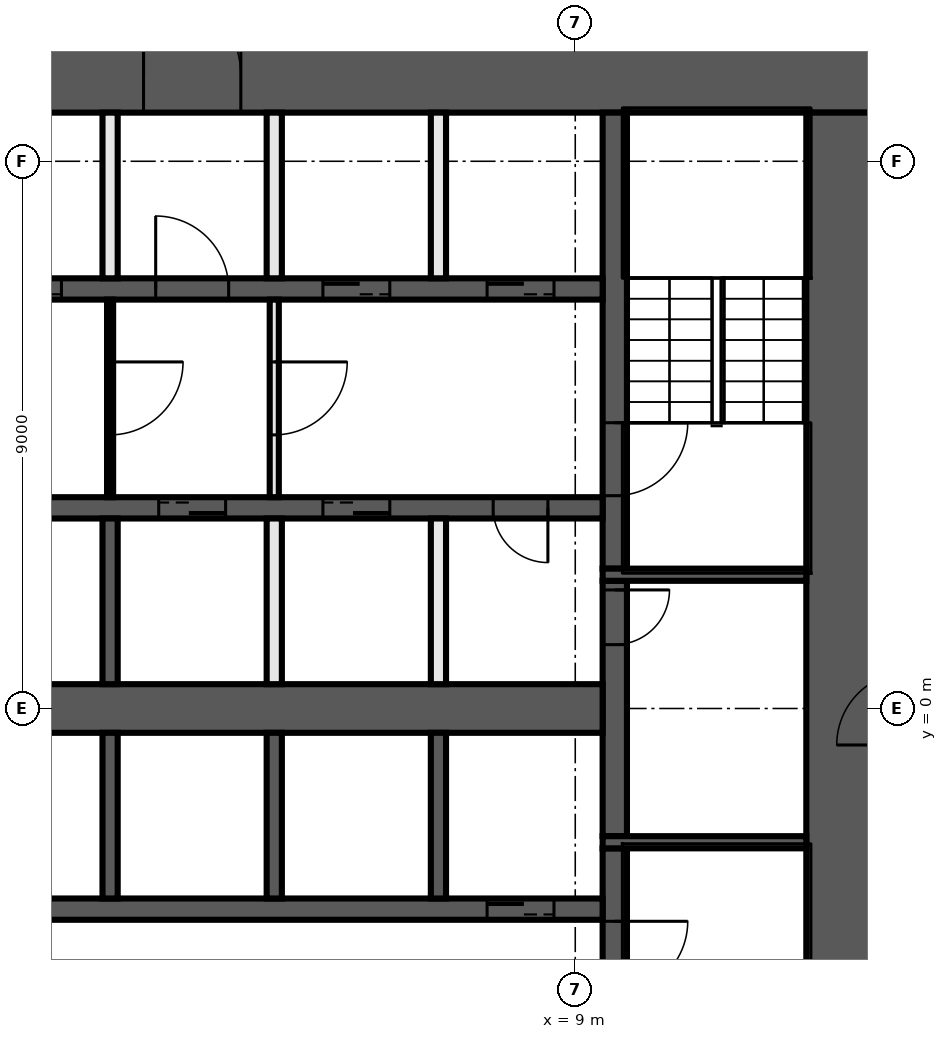
"""IFC4 building model, lengths in metres.
Left out: names, types, materials, properties, quantities, classifications, styles, units other than length and angle.
Written with IfcOpenShell. Run it as: python <this file> out.ifc"""

import sys

from ifc_helpers import new_model, si_unit, direction, frame, frame_2d, origin, place, context, subcontext, project, spatial, rectangle, extrude, element, fill, save


model = new_model("IFC4")
c1 = context("Model", 3, precision=1e-05, world=origin(), true_north=direction((0.0, 1.0)))
c2 = subcontext(c1, "Body", "Model", "MODEL_VIEW")
j1 = project(units=[si_unit("LENGTHUNIT", "METRE"), si_unit("PLANEANGLEUNIT", "RADIAN")], contexts=[c1])
p1 = place(None, origin())
s1 = spatial("IfcSite", under=j1, at=p1, CompositionType="ELEMENT")
p2 = place(p1, origin())
s2 = spatial("IfcBuilding", under=s1, at=p2, CompositionType="ELEMENT")
p3 = place(p2, frame((0.0, 0.0, -11.5)))
s3 = spatial("IfcBuildingStorey", under=s2, at=p3, CompositionType="ELEMENT", Elevation=-11.5)
p4 = place(p3, frame((-14.0, 10.4, 0.0), z_axis=(0.0, 0.0, 1.0), x_axis=(1.0, 0.0, 0.0)))
e1 = element("IfcWall", 1, at=p4, inside=s3, PredefinedType="SHEAR", context=c2, shape_type="SweptSolid", body=[
    extrude(rectangle(XDim=28.0, YDim=1.2, at=frame_2d((14.0, 0.0))), origin(), (0.0, 0.0, 1.0), 5.1),
])
p5 = place(p4, frame((15.9, 0.0, 0.0)))
e2 = element("IfcOpeningElement", 2, at=p5, cuts=e1, PredefinedType="OPENING", context=c2, shape_type="SweptSolid", body=[
    extrude(rectangle(XDim=1.6, YDim=2.1, at=frame_2d((0.8, 1.05))), frame((0.0, 0.61, 0.0), z_axis=(0.0, -1.0, 0.0), x_axis=(1.0, 0.0, 0.0)), (0.0, 0.0, 1.0), 1.22),
])
p6 = place(p3, frame((13.4, 9.8, 0.0), z_axis=(0.0, 0.0, 1.0), x_axis=(0.0, -1.0, 0.0)))
e3 = element("IfcWall", 3, at=p6, inside=s3, PredefinedType="SHEAR", context=c2, shape_type="SweptSolid", body=[
    extrude(rectangle(XDim=19.6, YDim=1.2, at=frame_2d((9.8, 0.0))), origin(), (0.0, 0.0, 1.0), 5.1),
])
p7 = place(p3, frame((9.65, -2.3, 0.0), z_axis=(0.0, 0.0, 1.0), x_axis=(0.0, -1.0, 0.0)))
e4 = element("IfcWall", 4, at=p7, inside=s3, PredefinedType="SHEAR", context=c2, shape_type="SweptSolid", body=[
    extrude(rectangle(XDim=7.5, YDim=0.4, at=frame_2d((3.75, 0.0))), origin(), (0.0, 0.0, 1.0), 5.1),
])
p8 = place(p7, frame((1.2, 0.0, 0.0)))
e5 = element("IfcOpeningElement", 5, at=p8, cuts=e4, PredefinedType="OPENING", context=c2, shape_type="SweptSolid", body=[
    extrude(rectangle(XDim=1.2, YDim=2.1, at=frame_2d((0.6, 1.05))), frame((0.0, 0.21, 0.0), z_axis=(0.0, -1.0, 0.0), x_axis=(1.0, 0.0, 0.0)), (0.0, 0.0, 1.0), 0.42),
])
p9 = place(p3, frame((9.65, 2.1, 0.0), z_axis=(0.0, 0.0, 1.0), x_axis=(0.0, -1.0, 0.0)))
e6 = element("IfcWall", 6, at=p9, inside=s3, PredefinedType="SHEAR", context=c2, shape_type="SweptSolid", body=[
    extrude(rectangle(XDim=4.2, YDim=0.4, at=frame_2d((2.1, 0.0))), origin(), (0.0, 0.0, 1.0), 5.1),
])
p10 = place(p9, frame((0.15, 0.0, 0.0)))
e7 = element("IfcOpeningElement", 7, at=p10, cuts=e6, PredefinedType="OPENING", context=c2, shape_type="SweptSolid", body=[
    extrude(rectangle(XDim=0.9, YDim=2.1, at=frame_2d((0.45, 1.05))), frame((0.0, 0.21, 0.0), z_axis=(0.0, -1.0, 0.0), x_axis=(1.0, 0.0, 0.0)), (0.0, 0.0, 1.0), 0.42),
])
p11 = place(p3, frame((9.65, 9.8, 0.0), z_axis=(0.0, 0.0, 1.0), x_axis=(0.0, -1.0, 0.0)))
e8 = element("IfcWall", 8, at=p11, inside=s3, PredefinedType="SHEAR", context=c2, shape_type="SweptSolid", body=[
    extrude(rectangle(XDim=7.5, YDim=0.4, at=frame_2d((3.75, 0.0))), origin(), (0.0, 0.0, 1.0), 5.1),
])
p12 = place(p11, frame((5.1, 0.0, 0.0)))
e9 = element("IfcOpeningElement", 9, at=p12, cuts=e8, PredefinedType="OPENING", context=c2, shape_type="SweptSolid", body=[
    extrude(rectangle(XDim=1.2, YDim=2.1, at=frame_2d((0.6, 1.05))), frame((0.0, 0.21, 0.0), z_axis=(0.0, -1.0, 0.0), x_axis=(1.0, 0.0, 0.0)), (0.0, 0.0, 1.0), 0.42),
])
for number, where, z_axis, x_axis in (
    (10, (9.45, 2.2, 0.0), (0.0, 0.0, 1.0), (1.0, 0.0, 0.0)),
    (11, (9.45, -2.2, 0.0), (0.0, 0.0, 1.0), (1.0, 0.0, 0.0)),
):
    element("IfcWall", number, at=place(p3, frame(where, z_axis=z_axis, x_axis=x_axis)), inside=s3, PredefinedType="SHEAR", context=c2, shape_type="SweptSolid", body=[
        extrude(rectangle(XDim=3.35, YDim=0.2, at=frame_2d((1.675, 0.0))), origin(), (0.0, 0.0, 1.0), 5.1),
    ])
p13 = place(p3, frame((-9.45, 6.9, 0.0), z_axis=(0.0, 0.0, 1.0), x_axis=(1.0, 0.0, 0.0)))
e12 = element("IfcWall", 12, at=p13, inside=s3, PredefinedType="SHEAR", context=c2, shape_type="SweptSolid", body=[
    extrude(rectangle(XDim=18.9, YDim=0.35, at=frame_2d((9.45, 0.0))), origin(), (0.0, 0.0, 1.0), 5.1),
])
p14 = place(p13, frame((0.8, 0.0, 0.0)))
e13 = element("IfcOpeningElement", 13, at=p14, cuts=e12, PredefinedType="OPENING", context=c2, shape_type="SweptSolid", body=[
    extrude(rectangle(XDim=1.1, YDim=2.1, at=frame_2d((0.55, 1.05))), frame((0.0, 0.185, 0.0), z_axis=(0.0, -1.0, 0.0), x_axis=(1.0, 0.0, 0.0)), (0.0, 0.0, 1.0), 0.37),
])
p15 = place(p13, frame((3.5, 0.0, 0.0)))
e14 = element("IfcOpeningElement", 14, at=p15, cuts=e12, PredefinedType="OPENING", context=c2, shape_type="SweptSolid", body=[
    extrude(rectangle(XDim=1.1, YDim=2.1, at=frame_2d((0.55, 1.05))), frame((0.0, 0.185, 0.0), z_axis=(0.0, -1.0, 0.0), x_axis=(1.0, 0.0, 0.0)), (0.0, 0.0, 1.0), 0.37),
])
p16 = place(p13, frame((6.2, 0.0, 0.0)))
e15 = element("IfcOpeningElement", 15, at=p16, cuts=e12, PredefinedType="OPENING", context=c2, shape_type="SweptSolid", body=[
    extrude(rectangle(XDim=1.1, YDim=2.1, at=frame_2d((0.55, 1.05))), frame((0.0, 0.185, 0.0), z_axis=(0.0, -1.0, 0.0), x_axis=(1.0, 0.0, 0.0)), (0.0, 0.0, 1.0), 0.37),
])
p17 = place(p13, frame((8.9, 0.0, 0.0)))
e16 = element("IfcOpeningElement", 16, at=p17, cuts=e12, PredefinedType="OPENING", context=c2, shape_type="SweptSolid", body=[
    extrude(rectangle(XDim=1.1, YDim=2.1, at=frame_2d((0.55, 1.05))), frame((0.0, 0.185, 0.0), z_axis=(0.0, -1.0, 0.0), x_axis=(1.0, 0.0, 0.0)), (0.0, 0.0, 1.0), 0.37),
])
p18 = place(p13, frame((11.55, 0.0, 0.0)))
e17 = element("IfcOpeningElement", 17, at=p18, cuts=e12, PredefinedType="OPENING", context=c2, shape_type="SweptSolid", body=[
    extrude(rectangle(XDim=1.2, YDim=2.1, at=frame_2d((0.6, 1.05))), frame((0.0, 0.185, 0.0), z_axis=(0.0, -1.0, 0.0), x_axis=(1.0, 0.0, 0.0)), (0.0, 0.0, 1.0), 0.37),
])
p19 = place(p13, frame((14.3, 0.0, 0.0)))
e18 = element("IfcOpeningElement", 18, at=p19, cuts=e12, PredefinedType="OPENING", context=c2, shape_type="SweptSolid", body=[
    extrude(rectangle(XDim=1.1, YDim=2.1, at=frame_2d((0.55, 1.05))), frame((0.0, 0.185, 0.0), z_axis=(0.0, -1.0, 0.0), x_axis=(1.0, 0.0, 0.0)), (0.0, 0.0, 1.0), 0.37),
])
p20 = place(p13, frame((17.0, 0.0, 0.0)))
e19 = element("IfcOpeningElement", 19, at=p20, cuts=e12, PredefinedType="OPENING", context=c2, shape_type="SweptSolid", body=[
    extrude(rectangle(XDim=1.1, YDim=2.1, at=frame_2d((0.55, 1.05))), frame((0.0, 0.185, 0.0), z_axis=(0.0, -1.0, 0.0), x_axis=(1.0, 0.0, 0.0)), (0.0, 0.0, 1.0), 0.37),
])
p21 = place(p3, frame((9.45, 3.3, 0.0), z_axis=(0.0, 0.0, 1.0), x_axis=(-1.0, 0.0, 0.0)))
e20 = element("IfcWall", 20, at=p21, inside=s3, PredefinedType="SHEAR", context=c2, shape_type="SweptSolid", body=[
    extrude(rectangle(XDim=18.9, YDim=0.35, at=frame_2d((9.45, 0.0))), origin(), (0.0, 0.0, 1.0), 5.1),
])
p22 = place(p21, frame((6.2, 0.0, 0.0)))
e21 = element("IfcOpeningElement", 21, at=p22, cuts=e20, PredefinedType="OPENING", context=c2, shape_type="SweptSolid", body=[
    extrude(rectangle(XDim=1.1, YDim=2.1, at=frame_2d((0.55, 1.05))), frame((0.0, 0.185, 0.0), z_axis=(0.0, -1.0, 0.0), x_axis=(1.0, 0.0, 0.0)), (0.0, 0.0, 1.0), 0.37),
])
p23 = place(p21, frame((3.5, 0.0, 0.0)))
e22 = element("IfcOpeningElement", 22, at=p23, cuts=e20, PredefinedType="OPENING", context=c2, shape_type="SweptSolid", body=[
    extrude(rectangle(XDim=1.1, YDim=2.1, at=frame_2d((0.55, 1.05))), frame((0.0, 0.185, 0.0), z_axis=(0.0, -1.0, 0.0), x_axis=(1.0, 0.0, 0.0)), (0.0, 0.0, 1.0), 0.37),
])
p24 = place(p21, frame((0.9, 0.0, 0.0)))
e23 = element("IfcOpeningElement", 23, at=p24, cuts=e20, PredefinedType="OPENING", context=c2, shape_type="SweptSolid", body=[
    extrude(rectangle(XDim=0.9, YDim=2.1, at=frame_2d((0.45, 1.05))), frame((0.0, 0.185, 0.0), z_axis=(0.0, -1.0, 0.0), x_axis=(1.0, 0.0, 0.0)), (0.0, 0.0, 1.0), 0.37),
])
p25 = place(p3, frame((-9.45, -3.3, 0.0), z_axis=(0.0, 0.0, 1.0), x_axis=(1.0, 0.0, 0.0)))
e24 = element("IfcWall", 24, at=p25, inside=s3, PredefinedType="SHEAR", context=c2, shape_type="SweptSolid", body=[
    extrude(rectangle(XDim=18.9, YDim=0.35, at=frame_2d((9.45, 0.0))), origin(), (0.0, 0.0, 1.0), 5.1),
])
p26 = place(p25, frame((17.0, 0.0, 0.0)))
e25 = element("IfcOpeningElement", 25, at=p26, cuts=e24, PredefinedType="OPENING", context=c2, shape_type="SweptSolid", body=[
    extrude(rectangle(XDim=1.1, YDim=2.1, at=frame_2d((0.55, 1.05))), frame((0.0, 0.185, 0.0), z_axis=(0.0, -1.0, 0.0), x_axis=(1.0, 0.0, 0.0)), (0.0, 0.0, 1.0), 0.37),
])
p27 = place(p25, frame((0.9, 0.0, 0.0)))
e26 = element("IfcOpeningElement", 26, at=p27, cuts=e24, PredefinedType="OPENING", context=c2, shape_type="SweptSolid", body=[
    extrude(rectangle(XDim=0.9, YDim=2.1, at=frame_2d((0.45, 1.05))), frame((0.0, 0.185, 0.0), z_axis=(0.0, -1.0, 0.0), x_axis=(1.0, 0.0, 0.0)), (0.0, 0.0, 1.0), 0.37),
])
p28 = place(p25, frame((3.6, 0.0, 0.0)))
e27 = element("IfcOpeningElement", 27, at=p28, cuts=e24, PredefinedType="OPENING", context=c2, shape_type="SweptSolid", body=[
    extrude(rectangle(XDim=0.9, YDim=2.1, at=frame_2d((0.45, 1.05))), frame((0.0, 0.185, 0.0), z_axis=(0.0, -1.0, 0.0), x_axis=(1.0, 0.0, 0.0)), (0.0, 0.0, 1.0), 0.37),
])
p29 = place(p25, frame((7.65, 0.0, 0.0)))
e28 = element("IfcOpeningElement", 28, at=p29, cuts=e24, PredefinedType="OPENING", context=c2, shape_type="SweptSolid", body=[
    extrude(rectangle(XDim=0.9, YDim=2.1, at=frame_2d((0.45, 1.05))), frame((0.0, 0.185, 0.0), z_axis=(0.0, -1.0, 0.0), x_axis=(1.0, 0.0, 0.0)), (0.0, 0.0, 1.0), 0.37),
])
p30 = place(p3, frame((-9.45, 0.0, 0.0), z_axis=(0.0, 0.0, 1.0), x_axis=(1.0, 0.0, 0.0)))
e29 = element("IfcWall", 29, at=p30, inside=s3, PredefinedType="SHEAR", context=c2, shape_type="SweptSolid", body=[
    extrude(rectangle(XDim=18.9, YDim=0.8, at=frame_2d((9.45, 0.0))), origin(), (0.0, 0.0, 1.0), 5.1),
])
p31 = place(p3, frame((6.75, -3.125, 0.0), z_axis=(0.0, 0.0, 1.0), x_axis=(0.0, 1.0, 0.0)))
e30 = element("IfcWall", 30, at=p31, inside=s3, PredefinedType="SHEAR", context=c2, shape_type="SweptSolid", body=[
    extrude(rectangle(XDim=2.725, YDim=0.25, at=frame_2d((1.363, 0.0))), origin(), (0.0, 0.0, 1.0), 5.1),
])
for number, where, z_axis, x_axis in (
    (31, (6.75, 0.4, 0.0), (0.0, 0.0, 1.0), (0.0, 1.0, 0.0)),
    (32, (6.75, 7.075, 0.0), (0.0, 0.0, 1.0), (0.0, 1.0, 0.0)),
):
    element("IfcWall", number, at=place(p3, frame(where, z_axis=z_axis, x_axis=x_axis)), inside=s3, PredefinedType="SOLIDWALL", context=c2, shape_type="SweptSolid", body=[
        extrude(rectangle(XDim=2.725, YDim=0.25, at=frame_2d((1.363, 0.0))), origin(), (0.0, 0.0, 1.0), 5.1),
    ])
p32 = place(p3, frame((4.05, 6.725, 0.0), z_axis=(0.0, 0.0, 1.0), x_axis=(0.0, -1.0, 0.0)))
e33 = element("IfcWall", 33, at=p32, inside=s3, PredefinedType="PARTITIONING", context=c2, shape_type="SweptSolid", body=[
    extrude(rectangle(XDim=3.25, YDim=0.15, at=frame_2d((1.625, 0.0))), origin(), (0.0, 0.0, 1.0), 5.1),
])
p33 = place(p32, frame((1.025, 0.0, 0.0)))
e34 = element("IfcOpeningElement", 34, at=p33, cuts=e33, PredefinedType="OPENING", context=c2, shape_type="SweptSolid", body=[
    extrude(rectangle(XDim=1.2, YDim=2.1, at=frame_2d((0.6, 1.05))), frame((0.0, 0.085, 0.0), z_axis=(0.0, -1.0, 0.0), x_axis=(1.0, 0.0, 0.0)), (0.0, 0.0, 1.0), 0.17),
])
p34 = place(p3, frame((4.05, -3.125, 0.0), z_axis=(0.0, 0.0, 1.0), x_axis=(0.0, 1.0, 0.0)))
e35 = element("IfcWall", 35, at=p34, inside=s3, PredefinedType="SHEAR", context=c2, shape_type="SweptSolid", body=[
    extrude(rectangle(XDim=2.725, YDim=0.25, at=frame_2d((1.363, 0.0))), origin(), (0.0, 0.0, 1.0), 5.1),
])
for number, where, z_axis, x_axis in (
    (36, (4.05, 0.4, 0.0), (0.0, 0.0, 1.0), (0.0, 1.0, 0.0)),
    (37, (4.05, 7.075, 0.0), (0.0, 0.0, 1.0), (0.0, 1.0, 0.0)),
):
    element("IfcWall", number, at=place(p3, frame(where, z_axis=z_axis, x_axis=x_axis)), inside=s3, PredefinedType="SOLIDWALL", context=c2, shape_type="SweptSolid", body=[
        extrude(rectangle(XDim=2.725, YDim=0.25, at=frame_2d((1.363, 0.0))), origin(), (0.0, 0.0, 1.0), 5.1),
    ])
p35 = place(p3, frame((1.35, 6.725, 0.0), z_axis=(0.0, 0.0, 1.0), x_axis=(0.0, -1.0, 0.0)))
e38 = element("IfcWall", 38, at=p35, inside=s3, PredefinedType="PARTITIONING", context=c2, shape_type="SweptSolid", body=[
    extrude(rectangle(XDim=3.25, YDim=0.1, at=frame_2d((1.625, 0.0))), origin(), (0.0, 0.0, 1.0), 5.1),
])
p36 = place(p35, frame((1.025, 0.0, 0.0)))
e39 = element("IfcOpeningElement", 39, at=p36, cuts=e38, PredefinedType="OPENING", context=c2, shape_type="SweptSolid", body=[
    extrude(rectangle(XDim=1.2, YDim=2.1, at=frame_2d((0.6, 1.05))), frame((0.0, 0.06, 0.0), z_axis=(0.0, -1.0, 0.0), x_axis=(1.0, 0.0, 0.0)), (0.0, 0.0, 1.0), 0.12),
])
for number, where, z_axis, x_axis in (
    (40, (1.35, -3.125, 0.0), (0.0, 0.0, 1.0), (0.0, 1.0, 0.0)),
    (41, (1.35, 0.4, 0.0), (0.0, 0.0, 1.0), (0.0, 1.0, 0.0)),
):
    element("IfcWall", number, at=place(p3, frame(where, z_axis=z_axis, x_axis=x_axis)), inside=s3, PredefinedType="SHEAR", context=c2, shape_type="SweptSolid", body=[
        extrude(rectangle(XDim=2.725, YDim=0.25, at=frame_2d((1.363, 0.0))), origin(), (0.0, 0.0, 1.0), 5.1),
    ])
p37 = place(p3, frame((1.35, 7.075, 0.0), z_axis=(0.0, 0.0, 1.0), x_axis=(0.0, 1.0, 0.0)))
e42 = element("IfcWall", 42, at=p37, inside=s3, PredefinedType="SOLIDWALL", context=c2, shape_type="SweptSolid", body=[
    extrude(rectangle(XDim=2.725, YDim=0.25, at=frame_2d((1.363, 0.0))), origin(), (0.0, 0.0, 1.0), 5.1),
])
p38 = place(p10, origin())
e43 = element("IfcDoor", 43, at=p38, inside=s3, OperationType="SINGLE_SWING_RIGHT", PredefinedType="DOOR", context=c2, shape_type="SweptSolid", body=[
    extrude(rectangle(XDim=0.9, YDim=2.1, at=frame_2d((0.45, 1.05))), frame((0.0, 0.025, 0.0), z_axis=(0.0, -1.0, 0.0), x_axis=(1.0, 0.0, 0.0)), (0.0, 0.0, 1.0), 0.05),
])
fill(e7, e43)
p39 = place(p17, origin())
e44 = element("IfcDoor", 44, at=p39, inside=s3, OperationType="DOUBLE_DOOR_SLIDING", PredefinedType="DOOR", context=c2, shape_type="SweptSolid", body=[
    extrude(rectangle(XDim=1.1, YDim=2.1, at=frame_2d((0.55, 1.05))), frame((0.0, 0.025, 0.0), z_axis=(0.0, -1.0, 0.0), x_axis=(1.0, 0.0, 0.0)), (0.0, 0.0, 1.0), 0.05),
])
fill(e16, e44)
p40 = place(p5, origin())
e45 = element("IfcDoor", 45, at=p40, inside=s3, OperationType="DOUBLE_DOOR_SINGLE_SWING", PredefinedType="DOOR", context=c2, shape_type="SweptSolid", body=[
    extrude(rectangle(XDim=1.6, YDim=2.1, at=frame_2d((0.8, 1.05))), frame((0.0, 0.025, 0.0), z_axis=(0.0, -1.0, 0.0), x_axis=(1.0, 0.0, 0.0)), (0.0, 0.0, 1.0), 0.05),
])
fill(e2, e45)
p41 = place(p18, origin())
e46 = element("IfcDoor", 46, at=p41, inside=s3, OperationType="SINGLE_SWING_LEFT", PredefinedType="DOOR", context=c2, shape_type="SweptSolid", body=[
    extrude(rectangle(XDim=1.2, YDim=2.1, at=frame_2d((0.6, 1.05))), frame((0.0, 0.025, 0.0), z_axis=(0.0, -1.0, 0.0), x_axis=(1.0, 0.0, 0.0)), (0.0, 0.0, 1.0), 0.05),
])
fill(e17, e46)
p42 = place(p19, origin())
e47 = element("IfcDoor", 47, at=p42, inside=s3, OperationType="DOUBLE_DOOR_SLIDING", PredefinedType="DOOR", context=c2, shape_type="SweptSolid", body=[
    extrude(rectangle(XDim=1.1, YDim=2.1, at=frame_2d((0.55, 1.05))), frame((0.0, 0.025, 0.0), z_axis=(0.0, -1.0, 0.0), x_axis=(1.0, 0.0, 0.0)), (0.0, 0.0, 1.0), 0.05),
])
fill(e18, e47)
p43 = place(p20, origin())
e48 = element("IfcDoor", 48, at=p43, inside=s3, OperationType="DOUBLE_DOOR_SLIDING", PredefinedType="DOOR", context=c2, shape_type="SweptSolid", body=[
    extrude(rectangle(XDim=1.1, YDim=2.1, at=frame_2d((0.55, 1.05))), frame((0.0, 0.025, 0.0), z_axis=(0.0, -1.0, 0.0), x_axis=(1.0, 0.0, 0.0)), (0.0, 0.0, 1.0), 0.05),
])
fill(e19, e48)
p44 = place(p22, origin())
e49 = element("IfcDoor", 49, at=p44, inside=s3, OperationType="DOUBLE_DOOR_SLIDING", PredefinedType="DOOR", context=c2, shape_type="SweptSolid", body=[
    extrude(rectangle(XDim=1.1, YDim=2.1, at=frame_2d((0.55, 1.05))), frame((0.0, 0.025, 0.0), z_axis=(0.0, -1.0, 0.0), x_axis=(1.0, 0.0, 0.0)), (0.0, 0.0, 1.0), 0.05),
])
fill(e21, e49)
p45 = place(p23, origin())
e50 = element("IfcDoor", 50, at=p45, inside=s3, OperationType="DOUBLE_DOOR_SLIDING", PredefinedType="DOOR", context=c2, shape_type="SweptSolid", body=[
    extrude(rectangle(XDim=1.1, YDim=2.1, at=frame_2d((0.55, 1.05))), frame((0.0, 0.025, 0.0), z_axis=(0.0, -1.0, 0.0), x_axis=(1.0, 0.0, 0.0)), (0.0, 0.0, 1.0), 0.05),
])
fill(e22, e50)
p46 = place(p24, origin())
e51 = element("IfcDoor", 51, at=p46, inside=s3, OperationType="SINGLE_SWING_LEFT", PredefinedType="DOOR", context=c2, shape_type="SweptSolid", body=[
    extrude(rectangle(XDim=0.9, YDim=2.1, at=frame_2d((0.45, 1.05))), frame((0.0, 0.025, 0.0), z_axis=(0.0, -1.0, 0.0), x_axis=(1.0, 0.0, 0.0)), (0.0, 0.0, 1.0), 0.05),
])
fill(e23, e51)
p47 = place(p26, origin())
e52 = element("IfcDoor", 52, at=p47, inside=s3, OperationType="DOUBLE_DOOR_SLIDING", PredefinedType="DOOR", context=c2, shape_type="SweptSolid", body=[
    extrude(rectangle(XDim=1.1, YDim=2.1, at=frame_2d((0.55, 1.05))), frame((0.0, 0.025, 0.0), z_axis=(0.0, -1.0, 0.0), x_axis=(1.0, 0.0, 0.0)), (0.0, 0.0, 1.0), 0.05),
])
fill(e25, e52)
p48 = place(p12, origin())
e53 = element("IfcDoor", 53, at=p48, inside=s3, OperationType="SINGLE_SWING_LEFT", PredefinedType="DOOR", context=c2, shape_type="SweptSolid", body=[
    extrude(rectangle(XDim=1.2, YDim=2.1, at=frame_2d((0.6, 1.05))), frame((0.0, 0.025, 0.0), z_axis=(0.0, -1.0, 0.0), x_axis=(1.0, 0.0, 0.0)), (0.0, 0.0, 1.0), 0.05),
])
fill(e9, e53)
p49 = place(p8, origin())
e54 = element("IfcDoor", 54, at=p49, inside=s3, OperationType="SINGLE_SWING_RIGHT", PredefinedType="DOOR", context=c2, shape_type="SweptSolid", body=[
    extrude(rectangle(XDim=1.2, YDim=2.1, at=frame_2d((0.6, 1.05))), frame((0.0, 0.025, 0.0), z_axis=(0.0, -1.0, 0.0), x_axis=(1.0, 0.0, 0.0)), (0.0, 0.0, 1.0), 0.05),
])
fill(e5, e54)
p50 = place(p36, origin())
e55 = element("IfcDoor", 55, at=p50, inside=s3, OperationType="SINGLE_SWING_LEFT", PredefinedType="DOOR", context=c2, shape_type="SweptSolid", body=[
    extrude(rectangle(XDim=1.2, YDim=2.1, at=frame_2d((0.6, 1.05))), frame((0.0, 0.025, 0.0), z_axis=(0.0, -1.0, 0.0), x_axis=(1.0, 0.0, 0.0)), (0.0, 0.0, 1.0), 0.05),
])
fill(e39, e55)
p51 = place(p33, origin())
e56 = element("IfcDoor", 56, at=p51, inside=s3, OperationType="SINGLE_SWING_RIGHT", PredefinedType="DOOR", context=c2, shape_type="SweptSolid", body=[
    extrude(rectangle(XDim=1.2, YDim=2.1, at=frame_2d((0.6, 1.05))), frame((0.0, 0.025, 0.0), z_axis=(0.0, -1.0, 0.0), x_axis=(1.0, 0.0, 0.0)), (0.0, 0.0, 1.0), 0.05),
])
fill(e34, e56)
save(model, sys.argv[1])
